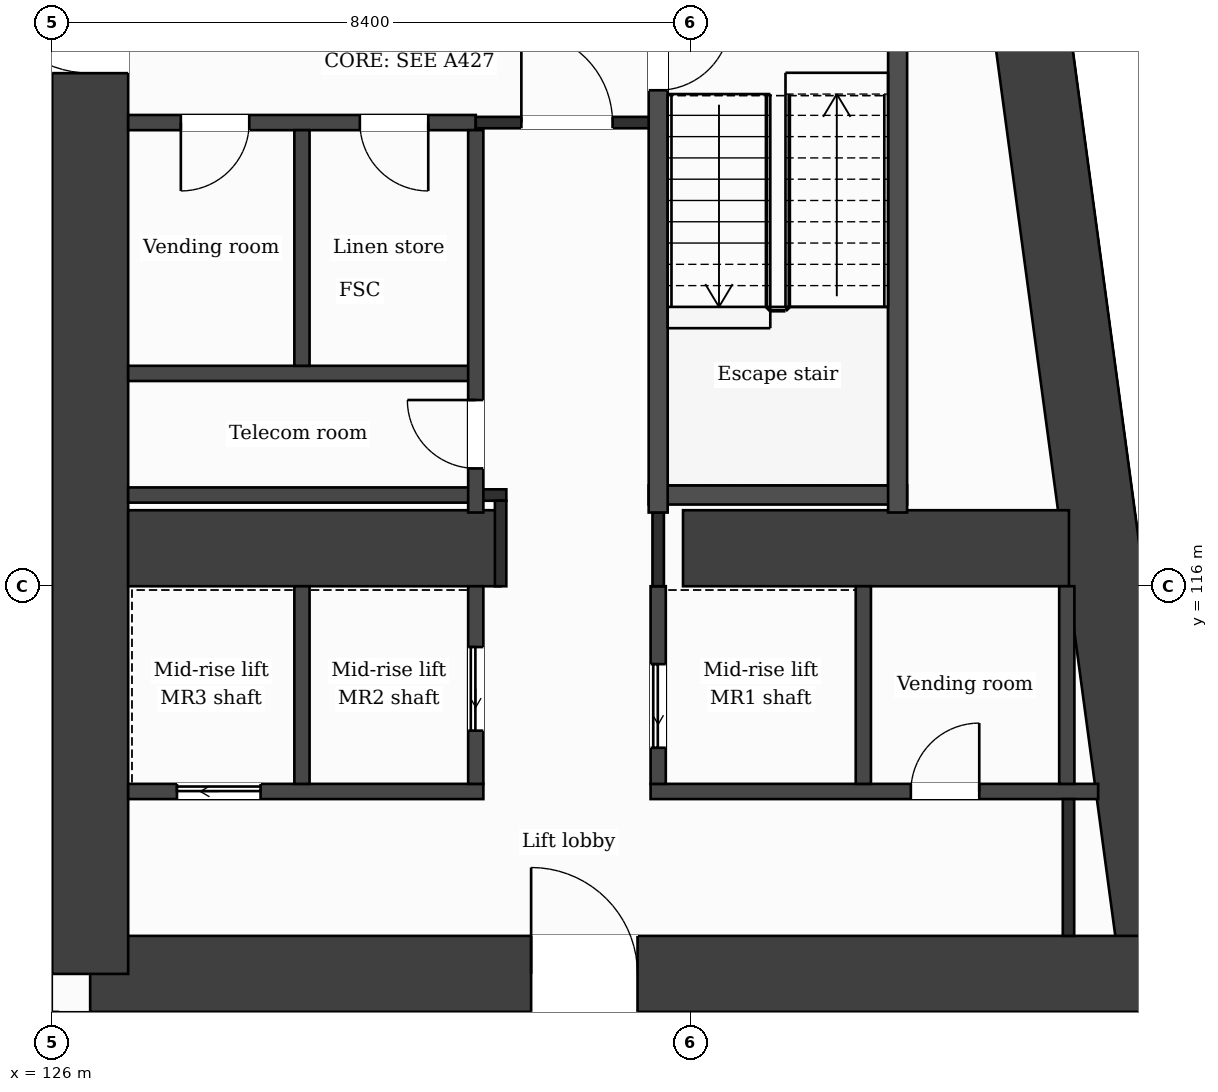
"""IFC4 building model, lengths in metres.
Left out: names, types, materials, properties, quantities, classifications, styles, units other than length and angle.
Written with IfcOpenShell. Run it as: python <this file> out.ifc"""

import sys

from ifc_helpers import new_model, si_unit, direction, frame, frame_2d, origin, place, context, subcontext, project, spatial, rectangle, extrude, element, fill, save


model = new_model("IFC4")
c1 = context("Model", 3, precision=1e-05, world=origin(), true_north=direction((0.0, 1.0)))
c2 = subcontext(c1, "Body", "Model", "MODEL_VIEW")
j1 = project(units=[si_unit("LENGTHUNIT", "METRE"), si_unit("PLANEANGLEUNIT", "RADIAN")], contexts=[c1])
p1 = place(None, origin())
s1 = spatial("IfcSite", under=j1, at=p1, CompositionType="ELEMENT")
p2 = place(p1, origin())
s2 = spatial("IfcBuilding", under=s1, at=p2, CompositionType="ELEMENT")
p3 = place(p2, frame((0.0, 0.0, 113.2)))
s3 = spatial("IfcBuildingStorey", under=s2, at=p3, CompositionType="ELEMENT", Elevation=113.2)
p4 = place(p3, frame((137.732, 131.9, 0.0), z_axis=(0.0, 0.0, 1.0), x_axis=(0.133411141623, -0.991060778808, 0.0)))
e1 = element("IfcWall", 1, at=p4, inside=s3, PredefinedType="SHEAR", context=c2, shape_type="SweptSolid", body=[
    extrude(rectangle(XDim=21.189, YDim=1.0, at=frame_2d((10.595, 0.0))), origin(), (0.0, 0.0, 1.0), 3.7),
])
p5 = place(p3, frame((140.559, 110.9, 0.0), z_axis=(0.0, 0.0, 1.0), x_axis=(-1.0, 0.0, 0.0)))
e2 = element("IfcWall", 2, at=p5, inside=s3, PredefinedType="SHEAR", context=c2, shape_type="SweptSolid", body=[
    extrude(rectangle(XDim=14.059, YDim=1.0, at=frame_2d((7.029, 0.0))), origin(), (0.0, 0.0, 1.0), 3.7),
])
p6 = place(p5, frame((6.858, 0.0, 0.0)))
e3 = element("IfcOpeningElement", 3, at=p6, cuts=e2, PredefinedType="OPENING", context=c2, shape_type="SweptSolid", body=[
    extrude(rectangle(XDim=1.4, YDim=2.1, at=frame_2d((0.7, 1.05))), frame((0.0, 0.51, 0.0), z_axis=(0.0, -1.0, 0.0), x_axis=(1.0, 0.0, 0.0)), (0.0, 0.0, 1.0), 1.02),
])
p7 = place(p3, frame((126.5, 110.9, 0.0), z_axis=(0.0, 0.0, 1.0), x_axis=(0.0, 1.0, 0.0)))
e4 = element("IfcWall", 4, at=p7, inside=s3, PredefinedType="SHEAR", context=c2, shape_type="SweptSolid", body=[
    extrude(rectangle(XDim=21.0, YDim=1.0, at=frame_2d((10.5, 0.0))), origin(), (0.0, 0.0, 1.0), 3.7),
])
p8 = place(p7, frame((11.85, 0.0, 0.0)))
e5 = element("IfcOpeningElement", 5, at=p8, cuts=e4, PredefinedType="OPENING", context=c2, shape_type="SweptSolid", body=[
    extrude(rectangle(XDim=1.4, YDim=2.1, at=frame_2d((0.7, 1.05))), frame((0.0, 0.51, 0.0), z_axis=(0.0, -1.0, 0.0), x_axis=(1.0, 0.0, 0.0)), (0.0, 0.0, 1.0), 1.02),
])
p9 = place(p3, frame((127.0, 116.5, 0.0), z_axis=(0.0, 0.0, 1.0), x_axis=(1.0, 0.0, 0.0)))
e6 = element("IfcWall", 6, at=p9, inside=s3, PredefinedType="SHEAR", context=c2, shape_type="SweptSolid", body=[
    extrude(rectangle(XDim=4.9, YDim=1.0, at=frame_2d((2.45, 0.0))), origin(), (0.0, 0.0, 1.0), 3.7),
])
p10 = place(p3, frame((134.3, 116.5, 0.0), z_axis=(0.0, 0.0, 1.0), x_axis=(1.0, 0.0, 0.0)))
e7 = element("IfcWall", 7, at=p10, inside=s3, PredefinedType="SHEAR", context=c2, shape_type="SweptSolid", body=[
    extrude(rectangle(XDim=5.077, YDim=1.0, at=frame_2d((2.539, 0.0))), origin(), (0.0, 0.0, 1.0), 3.7),
])
p11 = place(p3, frame((140.348, 103.85, 0.0), z_axis=(0.0, 0.0, 1.0), x_axis=(-0.133431549479, 0.991058031401, 0.0)))
e8 = element("IfcWall", 8, at=p11, inside=s3, PredefinedType="SOLIDWALL", context=c2, shape_type="SweptSolid", body=[
    extrude(rectangle(XDim=6.609, YDim=0.3, at=frame_2d((3.304, 0.0))), origin(), (0.0, 0.0, 1.0), 3.38),
])
p12 = place(p11, frame((0.737, 0.0, 0.9)))
e9 = element("IfcOpeningElement", 9, at=p12, cuts=e8, PredefinedType="OPENING", context=c2, shape_type="SweptSolid", body=[
    extrude(rectangle(XDim=1.2, YDim=2.1, at=frame_2d((0.6, 1.05))), frame((0.0, 0.16, 0.0), z_axis=(0.0, -1.0, 0.0), x_axis=(1.0, 0.0, 0.0)), (0.0, 0.0, 1.0), 0.32),
])
p13 = place(p11, frame((3.991, 0.0, 0.0)))
e10 = element("IfcOpeningElement", 10, at=p13, cuts=e8, PredefinedType="OPENING", context=c2, shape_type="SweptSolid", body=[
    extrude(rectangle(XDim=1.2, YDim=2.4, at=frame_2d((0.6, 1.2))), frame((0.0, 0.16, 0.0), z_axis=(0.0, -1.0, 0.0), x_axis=(1.0, 0.0, 0.0)), (0.0, 0.0, 1.0), 0.32),
])
p14 = place(p3, frame((127.0, 113.3, 0.0), z_axis=(0.0, 0.0, 1.0), x_axis=(1.0, 0.0, 0.0)))
e11 = element("IfcWall", 11, at=p14, inside=s3, PredefinedType="PARTITIONING", context=c2, shape_type="SweptSolid", body=[
    extrude(rectangle(XDim=4.673, YDim=0.2, at=frame_2d((2.336, 0.0))), origin(), (0.0, 0.0, 1.0), 3.38),
])
p15 = place(p14, frame((0.642, 0.0, 0.0)))
e12 = element("IfcOpeningElement", 12, at=p15, cuts=e11, PredefinedType="OPENING", context=c2, shape_type="SweptSolid", body=[
    extrude(rectangle(XDim=1.1, YDim=2.1, at=frame_2d((0.55, 1.05))), frame((0.0, 0.11, 0.0), z_axis=(0.0, -1.0, 0.0), x_axis=(1.0, 0.0, 0.0)), (0.0, 0.0, 1.0), 0.22),
])
p16 = place(p3, frame((133.873, 113.3, 0.0), z_axis=(0.0, 0.0, 1.0), x_axis=(1.0, 0.0, 0.0)))
e13 = element("IfcWall", 13, at=p16, inside=s3, PredefinedType="PARTITIONING", context=c2, shape_type="SweptSolid", body=[
    extrude(rectangle(XDim=5.888, YDim=0.2, at=frame_2d((2.944, 0.0))), origin(), (0.0, 0.0, 1.0), 3.38),
])
p17 = place(p16, frame((3.424, 0.0, 0.0)))
e14 = element("IfcOpeningElement", 14, at=p17, cuts=e13, PredefinedType="OPENING", context=c2, shape_type="SweptSolid", body=[
    extrude(rectangle(XDim=0.9, YDim=2.1, at=frame_2d((0.45, 1.05))), frame((0.0, 0.11, 0.0), z_axis=(0.0, -1.0, 0.0), x_axis=(1.0, 0.0, 0.0)), (0.0, 0.0, 1.0), 0.22),
])
p18 = place(p3, frame((127.0, 117.2, 0.0), z_axis=(0.0, 0.0, 1.0), x_axis=(1.0, 0.0, 0.0)))
e15 = element("IfcWall", 15, at=p18, inside=s3, PredefinedType="PARTITIONING", context=c2, shape_type="SweptSolid", body=[
    extrude(rectangle(XDim=4.573, YDim=0.2, at=frame_2d((2.287, 0.0))), origin(), (0.0, 0.0, 1.0), 3.38),
])
p19 = place(p3, frame((131.573, 117.2, 0.0), z_axis=(0.0, 0.0, 1.0), x_axis=(1.0, 0.0, 0.0)))
e16 = element("IfcWall", 16, at=p19, inside=s3, PredefinedType="PARTITIONING", context=c2, shape_type="SweptSolid", body=[
    extrude(rectangle(XDim=0.402, YDim=0.15, at=frame_2d((0.201, 0.0))), origin(), (0.0, 0.0, 1.0), 3.38),
])
p20 = place(p3, frame((133.848, 117.2, 0.0), z_axis=(0.0, 0.0, 1.0), x_axis=(1.0, 0.0, 0.0)))
e17 = element("IfcWall", 17, at=p20, inside=s3, PredefinedType="PARTITIONING", context=c2, shape_type="SweptSolid", body=[
    extrude(rectangle(XDim=3.4, YDim=0.25, at=frame_2d((1.7, 0.0))), origin(), (0.0, 0.0, 1.0), 3.38),
])
p21 = place(p3, frame((127.0, 118.8, 0.0), z_axis=(0.0, 0.0, 1.0), x_axis=(1.0, 0.0, 0.0)))
e18 = element("IfcWall", 18, at=p21, inside=s3, PredefinedType="PARTITIONING", context=c2, shape_type="SweptSolid", body=[
    extrude(rectangle(XDim=4.573, YDim=0.2, at=frame_2d((2.287, 0.0))), origin(), (0.0, 0.0, 1.0), 3.38),
])
p22 = place(p3, frame((127.0, 122.1, 0.0), z_axis=(0.0, 0.0, 1.0), x_axis=(1.0, 0.0, 0.0)))
e19 = element("IfcWall", 19, at=p22, inside=s3, PredefinedType="PARTITIONING", context=c2, shape_type="SweptSolid", body=[
    extrude(rectangle(XDim=4.573, YDim=0.2, at=frame_2d((2.287, 0.0))), origin(), (0.0, 0.0, 1.0), 3.38),
])
p23 = place(p22, frame((3.048, 0.0, 0.0)))
e20 = element("IfcOpeningElement", 20, at=p23, cuts=e19, PredefinedType="OPENING", context=c2, shape_type="SweptSolid", body=[
    extrude(rectangle(XDim=0.9, YDim=2.1, at=frame_2d((0.45, 1.05))), frame((0.0, 0.11, 0.0), z_axis=(0.0, -1.0, 0.0), x_axis=(1.0, 0.0, 0.0)), (0.0, 0.0, 1.0), 0.22),
])
p24 = place(p22, frame((0.693, 0.0, 0.0)))
e21 = element("IfcOpeningElement", 21, at=p24, cuts=e19, PredefinedType="OPENING", context=c2, shape_type="SweptSolid", body=[
    extrude(rectangle(XDim=0.9, YDim=2.1, at=frame_2d((0.45, 1.05))), frame((0.0, 0.11, 0.0), z_axis=(0.0, -1.0, 0.0), x_axis=(1.0, 0.0, 0.0)), (0.0, 0.0, 1.0), 0.22),
])
p25 = place(p3, frame((131.573, 122.1, 0.0), z_axis=(0.0, 0.0, 1.0), x_axis=(1.0, 0.0, 0.0)))
e22 = element("IfcWall", 22, at=p25, inside=s3, PredefinedType="PARTITIONING", context=c2, shape_type="SweptSolid", body=[
    extrude(rectangle(XDim=2.4, YDim=0.15, at=frame_2d((1.2, 0.0))), origin(), (0.0, 0.0, 1.0), 3.38),
])
p26 = place(p25, frame((0.6, 0.0, 0.0)))
e23 = element("IfcOpeningElement", 23, at=p26, cuts=e22, PredefinedType="OPENING", context=c2, shape_type="SweptSolid", body=[
    extrude(rectangle(XDim=1.2, YDim=2.1, at=frame_2d((0.6, 1.05))), frame((0.0, 0.085, 0.0), z_axis=(0.0, -1.0, 0.0), x_axis=(1.0, 0.0, 0.0)), (0.0, 0.0, 1.0), 0.17),
])
p27 = place(p3, frame((100.8, 122.45, 0.0), z_axis=(0.0, 0.0, 1.0), x_axis=(1.0, 0.0, 0.0)))
e24 = element("IfcWall", 24, at=p27, inside=s3, PredefinedType="PARTITIONING", context=c2, shape_type="SweptSolid", body=[
    extrude(rectangle(XDim=25.2, YDim=0.15, at=frame_2d((12.6, 0.0))), origin(), (0.0, 0.0, 1.0), 3.38),
])
p28 = place(p3, frame((126.0, 109.075, 0.0), z_axis=(0.0, 0.0, 1.0), x_axis=(0.0, 1.0, 0.0)))
e25 = element("IfcWall", 25, at=p28, inside=s3, PredefinedType="PARTITIONING", context=c2, shape_type="SweptSolid", body=[
    extrude(rectangle(XDim=1.325, YDim=0.15, at=frame_2d((0.663, 0.0))), origin(), (0.0, 0.0, 1.0), 3.38),
])
p29 = place(p3, frame((129.287, 113.4, 0.0), z_axis=(0.0, 0.0, 1.0), x_axis=(0.0, 1.0, 0.0)))
e26 = element("IfcWall", 26, at=p29, inside=s3, PredefinedType="PARTITIONING", context=c2, shape_type="SweptSolid", body=[
    extrude(rectangle(XDim=2.6, YDim=0.2, at=frame_2d((1.3, 0.0))), origin(), (0.0, 0.0, 1.0), 3.38),
])
p30 = place(p3, frame((129.287, 118.9, 0.0), z_axis=(0.0, 0.0, 1.0), x_axis=(0.0, 1.0, 0.0)))
e27 = element("IfcWall", 27, at=p30, inside=s3, PredefinedType="PARTITIONING", context=c2, shape_type="SweptSolid", body=[
    extrude(rectangle(XDim=3.1, YDim=0.2, at=frame_2d((1.55, 0.0))), origin(), (0.0, 0.0, 1.0), 3.38),
])
p31 = place(p3, frame((131.573, 113.4, 0.0), z_axis=(0.0, 0.0, 1.0), x_axis=(0.0, 1.0, 0.0)))
e28 = element("IfcWall", 28, at=p31, inside=s3, PredefinedType="PARTITIONING", context=c2, shape_type="SweptSolid", body=[
    extrude(rectangle(XDim=2.6, YDim=0.2, at=frame_2d((1.3, 0.0))), origin(), (0.0, 0.0, 1.0), 3.38),
])
p32 = place(p31, frame((0.7, 0.0, 0.0)))
e29 = element("IfcOpeningElement", 29, at=p32, cuts=e28, PredefinedType="OPENING", context=c2, shape_type="SweptSolid", body=[
    extrude(rectangle(XDim=1.1, YDim=2.1, at=frame_2d((0.55, 1.05))), frame((0.0, 0.11, 0.0), z_axis=(0.0, -1.0, 0.0), x_axis=(1.0, 0.0, 0.0)), (0.0, 0.0, 1.0), 0.22),
])
p33 = place(p3, frame((131.573, 116.97, 0.0), z_axis=(0.0, 0.0, 1.0), x_axis=(0.0, 1.0, 0.0)))
e30 = element("IfcWall", 30, at=p33, inside=s3, PredefinedType="PARTITIONING", context=c2, shape_type="SweptSolid", body=[
    extrude(rectangle(XDim=5.03, YDim=0.2, at=frame_2d((2.515, 0.0))), origin(), (0.0, 0.0, 1.0), 3.38),
])
p34 = place(p33, frame((0.58, 0.0, 0.0)))
e31 = element("IfcOpeningElement", 31, at=p34, cuts=e30, PredefinedType="OPENING", context=c2, shape_type="SweptSolid", body=[
    extrude(rectangle(XDim=0.9, YDim=2.1, at=frame_2d((0.45, 1.05))), frame((0.0, 0.11, 0.0), z_axis=(0.0, -1.0, 0.0), x_axis=(1.0, 0.0, 0.0)), (0.0, 0.0, 1.0), 0.22),
])
p35 = place(p3, frame((131.9, 116.0, 0.0), z_axis=(0.0, 0.0, 1.0), x_axis=(0.0, 1.0, 0.0)))
e32 = element("IfcWall", 32, at=p35, inside=s3, PredefinedType="PARTITIONING", context=c2, shape_type="SweptSolid", body=[
    extrude(rectangle(XDim=1.125, YDim=0.15, at=frame_2d((0.562, 0.0))), origin(), (0.0, 0.0, 1.0), 3.38),
])
p36 = place(p3, frame((133.973, 113.4, 0.0), z_axis=(0.0, 0.0, 1.0), x_axis=(0.0, 1.0, 0.0)))
e33 = element("IfcWall", 33, at=p36, inside=s3, PredefinedType="PARTITIONING", context=c2, shape_type="SweptSolid", body=[
    extrude(rectangle(XDim=2.6, YDim=0.2, at=frame_2d((1.3, 0.0))), origin(), (0.0, 0.0, 1.0), 3.38),
])
p37 = place(p36, frame((0.475, 0.0, 0.0)))
e34 = element("IfcOpeningElement", 34, at=p37, cuts=e33, PredefinedType="OPENING", context=c2, shape_type="SweptSolid", body=[
    extrude(rectangle(XDim=1.1, YDim=2.1, at=frame_2d((0.55, 1.05))), frame((0.0, 0.11, 0.0), z_axis=(0.0, -1.0, 0.0), x_axis=(1.0, 0.0, 0.0)), (0.0, 0.0, 1.0), 0.22),
])
p38 = place(p3, frame((133.973, 116.0, 0.0), z_axis=(0.0, 0.0, 1.0), x_axis=(0.0, 1.0, 0.0)))
e35 = element("IfcWall", 35, at=p38, inside=s3, PredefinedType="PARTITIONING", context=c2, shape_type="SweptSolid", body=[
    extrude(rectangle(XDim=0.97, YDim=0.15, at=frame_2d((0.485, 0.0))), origin(), (0.0, 0.0, 1.0), 3.38),
])
p39 = place(p3, frame((133.973, 116.97, 0.0), z_axis=(0.0, 0.0, 1.0), x_axis=(0.0, 1.0, 0.0)))
e36 = element("IfcWall", 36, at=p39, inside=s3, PredefinedType="PARTITIONING", context=c2, shape_type="SweptSolid", body=[
    extrude(rectangle(XDim=6.855, YDim=0.25, at=frame_2d((3.427, 0.0))), origin(), (0.0, 0.0, 1.0), 3.38),
])
p40 = place(p39, frame((5.555, 0.0, 0.0)))
e37 = element("IfcOpeningElement", 37, at=p40, cuts=e36, PredefinedType="OPENING", context=c2, shape_type="SweptSolid", body=[
    extrude(rectangle(XDim=0.95, YDim=2.1, at=frame_2d((0.475, 1.05))), frame((0.0, 0.135, 0.0), z_axis=(0.0, -1.0, 0.0), x_axis=(1.0, 0.0, 0.0)), (0.0, 0.0, 1.0), 0.27),
])
p41 = place(p3, frame((136.672, 113.4, 0.0), z_axis=(0.0, 0.0, 1.0), x_axis=(0.0, 1.0, 0.0)))
e38 = element("IfcWall", 38, at=p41, inside=s3, PredefinedType="PARTITIONING", context=c2, shape_type="SweptSolid", body=[
    extrude(rectangle(XDim=2.6, YDim=0.2, at=frame_2d((1.3, 0.0))), origin(), (0.0, 0.0, 1.0), 3.38),
])
p42 = place(p3, frame((137.123, 116.97, 0.0), z_axis=(0.0, 0.0, 1.0), x_axis=(0.0, 1.0, 0.0)))
e39 = element("IfcWall", 39, at=p42, inside=s3, PredefinedType="PARTITIONING", context=c2, shape_type="SweptSolid", body=[
    extrude(rectangle(XDim=6.855, YDim=0.25, at=frame_2d((3.427, 0.0))), origin(), (0.0, 0.0, 1.0), 3.38),
])
p43 = place(p3, frame((139.349, 113.4, 0.0), z_axis=(0.0, 0.0, 1.0), x_axis=(0.0, 1.0, 0.0)))
e40 = element("IfcWall", 40, at=p43, inside=s3, PredefinedType="PARTITIONING", context=c2, shape_type="SweptSolid", body=[
    extrude(rectangle(XDim=2.6, YDim=0.2, at=frame_2d((1.3, 0.0))), origin(), (0.0, 0.0, 1.0), 3.38),
])
p44 = place(p3, frame((139.371, 111.4, 0.0), z_axis=(0.0, 0.0, 1.0), x_axis=(0.0, 1.0, 0.0)))
e41 = element("IfcWall", 41, at=p44, inside=s3, PredefinedType="PARTITIONING", context=c2, shape_type="SweptSolid", body=[
    extrude(rectangle(XDim=1.8, YDim=0.15, at=frame_2d((0.9, 0.0))), origin(), (0.0, 0.0, 1.0), 3.38),
])
p45 = place(p26, origin())
e42 = element("IfcDoor", 42, at=p45, inside=s3, OperationType="SINGLE_SWING_LEFT", PredefinedType="DOOR", context=c2, shape_type="SweptSolid", body=[
    extrude(rectangle(XDim=1.2, YDim=2.1, at=frame_2d((0.6, 1.05))), frame((0.0, 0.025, 0.0), z_axis=(0.0, -1.0, 0.0), x_axis=(1.0, 0.0, 0.0)), (0.0, 0.0, 1.0), 0.05),
])
fill(e23, e42)
p46 = place(p23, origin())
e43 = element("IfcDoor", 43, at=p46, inside=s3, OperationType="SINGLE_SWING_RIGHT", PredefinedType="DOOR", context=c2, shape_type="SweptSolid", body=[
    extrude(rectangle(XDim=0.9, YDim=2.1, at=frame_2d((0.45, 1.05))), frame((0.0, 0.025, 0.0), z_axis=(0.0, -1.0, 0.0), x_axis=(1.0, 0.0, 0.0)), (0.0, 0.0, 1.0), 0.05),
])
fill(e20, e43)
p47 = place(p24, origin())
e44 = element("IfcDoor", 44, at=p47, inside=s3, OperationType="SINGLE_SWING_LEFT", PredefinedType="DOOR", context=c2, shape_type="SweptSolid", body=[
    extrude(rectangle(XDim=0.9, YDim=2.1, at=frame_2d((0.45, 1.05))), frame((0.0, 0.025, 0.0), z_axis=(0.0, -1.0, 0.0), x_axis=(1.0, 0.0, 0.0)), (0.0, 0.0, 1.0), 0.05),
])
fill(e21, e44)
p48 = place(p40, origin())
e45 = element("IfcDoor", 45, at=p48, inside=s3, OperationType="SINGLE_SWING_RIGHT", PredefinedType="DOOR", context=c2, shape_type="SweptSolid", body=[
    extrude(rectangle(XDim=0.95, YDim=2.1, at=frame_2d((0.475, 1.05))), frame((0.0, 0.025, 0.0), z_axis=(0.0, -1.0, 0.0), x_axis=(1.0, 0.0, 0.0)), (0.0, 0.0, 1.0), 0.05),
])
fill(e37, e45)
p49 = place(p34, origin())
e46 = element("IfcDoor", 46, at=p49, inside=s3, OperationType="SINGLE_SWING_RIGHT", PredefinedType="DOOR", context=c2, shape_type="SweptSolid", body=[
    extrude(rectangle(XDim=0.9, YDim=2.1, at=frame_2d((0.45, 1.05))), frame((0.0, 0.025, 0.0), z_axis=(0.0, -1.0, 0.0), x_axis=(1.0, 0.0, 0.0)), (0.0, 0.0, 1.0), 0.05),
])
fill(e31, e46)
p50 = place(p37, origin())
e47 = element("IfcDoor", 47, at=p50, inside=s3, OperationType="SLIDING_TO_LEFT", PredefinedType="DOOR", context=c2, shape_type="SweptSolid", body=[
    extrude(rectangle(XDim=1.1, YDim=2.1, at=frame_2d((0.55, 1.05))), frame((0.0, 0.025, 0.0), z_axis=(0.0, -1.0, 0.0), x_axis=(1.0, 0.0, 0.0)), (0.0, 0.0, 1.0), 0.05),
])
fill(e34, e47)
p51 = place(p32, origin())
e48 = element("IfcDoor", 48, at=p51, inside=s3, OperationType="SLIDING_TO_LEFT", PredefinedType="DOOR", context=c2, shape_type="SweptSolid", body=[
    extrude(rectangle(XDim=1.1, YDim=2.1, at=frame_2d((0.55, 1.05))), frame((0.0, 0.025, 0.0), z_axis=(0.0, -1.0, 0.0), x_axis=(1.0, 0.0, 0.0)), (0.0, 0.0, 1.0), 0.05),
])
fill(e29, e48)
p52 = place(p15, origin())
e49 = element("IfcDoor", 49, at=p52, inside=s3, OperationType="SLIDING_TO_LEFT", PredefinedType="DOOR", context=c2, shape_type="SweptSolid", body=[
    extrude(rectangle(XDim=1.1, YDim=2.1, at=frame_2d((0.55, 1.05))), frame((0.0, 0.025, 0.0), z_axis=(0.0, -1.0, 0.0), x_axis=(1.0, 0.0, 0.0)), (0.0, 0.0, 1.0), 0.05),
])
fill(e12, e49)
p53 = place(p17, origin())
e50 = element("IfcDoor", 50, at=p53, inside=s3, OperationType="SINGLE_SWING_RIGHT", PredefinedType="DOOR", context=c2, shape_type="SweptSolid", body=[
    extrude(rectangle(XDim=0.9, YDim=2.1, at=frame_2d((0.45, 1.05))), frame((0.0, 0.025, 0.0), z_axis=(0.0, -1.0, 0.0), x_axis=(1.0, 0.0, 0.0)), (0.0, 0.0, 1.0), 0.05),
])
fill(e14, e50)
p54 = place(p6, origin())
e51 = element("IfcDoor", 51, at=p54, inside=s3, OperationType="SINGLE_SWING_RIGHT", PredefinedType="DOOR", context=c2, shape_type="SweptSolid", body=[
    extrude(rectangle(XDim=1.4, YDim=2.1, at=frame_2d((0.7, 1.05))), frame((0.0, 0.025, 0.0), z_axis=(0.0, -1.0, 0.0), x_axis=(1.0, 0.0, 0.0)), (0.0, 0.0, 1.0), 0.05),
])
fill(e3, e51)
p55 = place(p8, origin())
e52 = element("IfcDoor", 52, at=p55, inside=s3, OperationType="SINGLE_SWING_RIGHT", PredefinedType="DOOR", context=c2, shape_type="SweptSolid", body=[
    extrude(rectangle(XDim=1.4, YDim=2.1, at=frame_2d((0.7, 1.05))), frame((0.0, 0.025, 0.0), z_axis=(0.0, -1.0, 0.0), x_axis=(1.0, 0.0, 0.0)), (0.0, 0.0, 1.0), 0.05),
])
fill(e5, e52)
save(model, sys.argv[1])
